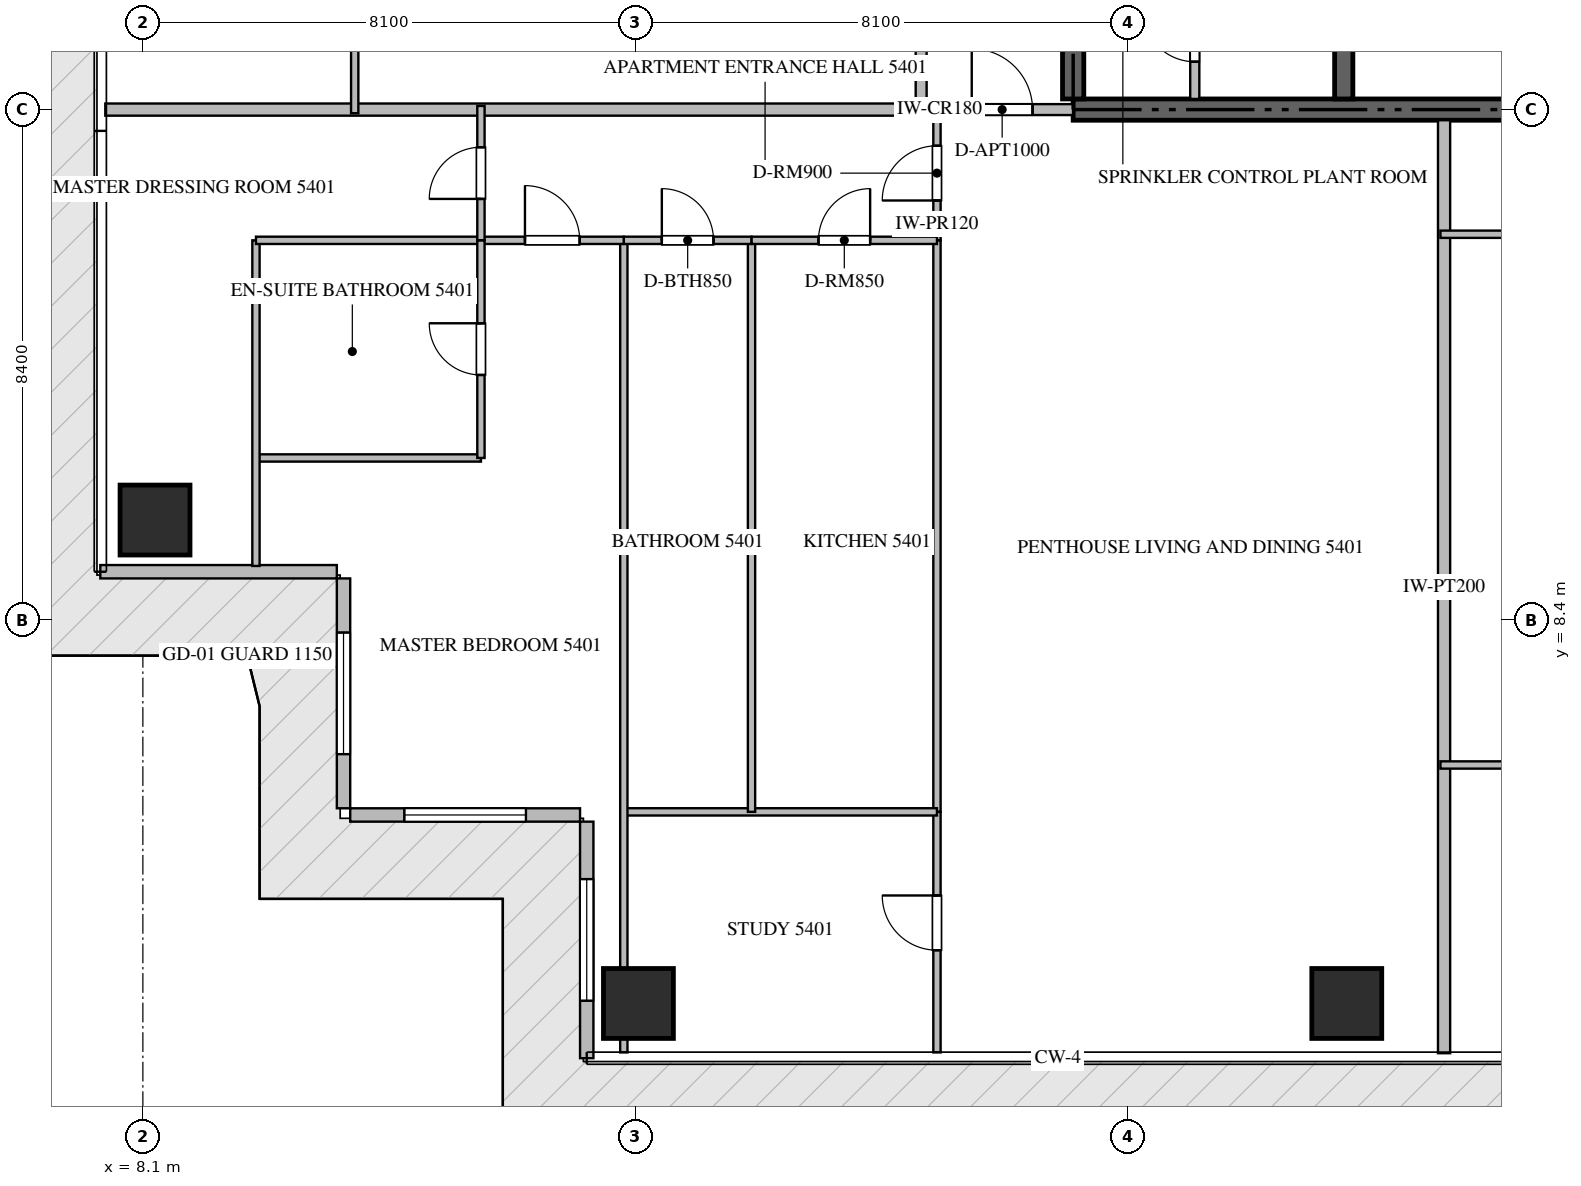
"""IFC4 building model, lengths in metres.
Left out: names, types, materials, properties, quantities, classifications, styles, units other than length and angle.
Written with IfcOpenShell. Run it as: python <this file> out.ifc"""

import sys

from ifc_helpers import new_model, si_unit, direction, frame, frame_2d, origin, origin_2d, place, context, subcontext, project, spatial, rectangle, extrude, source, transform, mapped, element, fill, save


model = new_model("IFC4")
c1 = context("Model", 3, precision=1e-05, world=origin(), true_north=direction((0.0, 1.0)))
c2 = subcontext(c1, "Body", "Model", "MODEL_VIEW")
j1 = project(units=[si_unit("LENGTHUNIT", "METRE"), si_unit("PLANEANGLEUNIT", "RADIAN")], contexts=[c1])
p1 = place(None, origin())
s1 = spatial("IfcSite", under=j1, at=p1, CompositionType="ELEMENT")
p2 = place(p1, origin())
s2 = spatial("IfcBuilding", under=s1, at=p2, CompositionType="ELEMENT")
p3 = place(p2, frame((0.0, 0.0, 218.15)))
s3 = spatial("IfcBuildingStorey", under=s2, at=p3, CompositionType="ELEMENT", Elevation=218.15)
p4 = place(p3, frame((23.4, 16.8, -0.26), z_axis=(0.0, 0.0, 1.0), x_axis=(1.0, 0.0, 0.0)))
e1 = element("IfcWall", 1, at=p4, inside=s3, PredefinedType="SHEAR", context=c2, shape_type="SweptSolid", body=[
    extrude(rectangle(XDim=18.0, YDim=0.35, at=frame_2d((9.0, 0.0))), origin(), (0.0, 0.0, 1.0), 3.848),
])
p5 = place(p3, frame((23.4, 16.975, -0.26), z_axis=(0.0, 0.0, 1.0), x_axis=(0.0, 1.0, 0.0)))
e2 = element("IfcWall", 2, at=p5, inside=s3, PredefinedType="SHEAR", context=c2, shape_type="SweptSolid", body=[
    extrude(rectangle(XDim=4.875, YDim=0.35, at=frame_2d((2.438, 0.0))), origin(), (0.0, 0.0, 1.0), 3.848),
])
p6 = place(p3, frame((27.85, 16.975, -0.26), z_axis=(0.0, 0.0, 1.0), x_axis=(0.0, 1.0, 0.0)))
e3 = element("IfcWall", 3, at=p6, inside=s3, PredefinedType="SHEAR", context=c2, shape_type="SweptSolid", body=[
    extrude(rectangle(XDim=4.875, YDim=0.3, at=frame_2d((2.438, 0.0))), origin(), (0.0, 0.0, 1.0), 3.848),
])
m1 = source(origin(), c2, "Body", "SweptSolid", [
    extrude(rectangle(XDim=1.15, YDim=1.15, at=origin_2d()), origin(), (0.0, 0.0, 1.0), 3.85),
])
for number, where, z_axis, x_axis in (
    (4, (16.25, 2.1, -0.26), (0.0, 0.0, 1.0), (1.0, 0.0, 0.0)),
    (5, (27.9, 2.1, -0.26), (0.0, 0.0, 1.0), (1.0, 0.0, 0.0)),
    (6, (8.3, 10.05, -0.26), (0.0, 0.0, 1.0), (1.0, 0.0, 0.0)),
):
    element("IfcColumn", number, at=place(p3, frame(where, z_axis=z_axis, x_axis=x_axis)), inside=s3, PredefinedType="COLUMN", context=c2, shape_type="MappedRepresentation", body=[
        mapped(m1, transform((0.0, 0.0, 0.0), scale=1.0)),
    ])
p7 = place(p3, frame((7.4, 9.2, 0.0), z_axis=(0.0, 0.0, 1.0), x_axis=(1.0, 0.0, 0.0)))
e7 = element("IfcWall", 7, at=p7, inside=s3, PredefinedType="ELEMENTEDWALL", context=c2, shape_type="SweptSolid", body=[
    extrude(rectangle(XDim=3.89, YDim=0.22, at=frame_2d((1.945, 0.0))), origin(), (0.0, 0.0, 1.0), 3.575),
])
p8 = place(p3, frame((11.4, 9.09, 0.0), z_axis=(0.0, 0.0, 1.0), x_axis=(0.0, -1.0, 0.0)))
e8 = element("IfcWall", 8, at=p8, inside=s3, PredefinedType="ELEMENTEDWALL", context=c2, shape_type="SweptSolid", body=[
    extrude(rectangle(XDim=3.78, YDim=0.22, at=frame_2d((1.89, 0.0))), origin(), (0.0, 0.0, 1.0), 3.575),
])
p9 = place(p8, frame((0.89, 0.0, 0.65)))
e9 = element("IfcOpeningElement", 9, at=p9, cuts=e8, PredefinedType="OPENING", context=c2, shape_type="SweptSolid", body=[
    extrude(rectangle(XDim=2.0, YDim=2.2, at=frame_2d((1.0, 1.1))), frame((0.0, 0.12, 0.0), z_axis=(0.0, -1.0, 0.0), x_axis=(1.0, 0.0, 0.0)), (0.0, 0.0, 1.0), 0.24),
])
p10 = place(p3, frame((11.51, 5.2, 0.0), z_axis=(0.0, 0.0, 1.0), x_axis=(1.0, 0.0, 0.0)))
e10 = element("IfcWall", 10, at=p10, inside=s3, PredefinedType="ELEMENTEDWALL", context=c2, shape_type="SweptSolid", body=[
    extrude(rectangle(XDim=3.78, YDim=0.22, at=frame_2d((1.89, 0.0))), origin(), (0.0, 0.0, 1.0), 3.575),
])
p11 = place(p10, frame((0.89, 0.0, 0.65)))
e11 = element("IfcOpeningElement", 11, at=p11, cuts=e10, PredefinedType="OPENING", context=c2, shape_type="SweptSolid", body=[
    extrude(rectangle(XDim=2.0, YDim=2.2, at=frame_2d((1.0, 1.1))), frame((0.0, 0.12, 0.0), z_axis=(0.0, -1.0, 0.0), x_axis=(1.0, 0.0, 0.0)), (0.0, 0.0, 1.0), 0.24),
])
p12 = place(p3, frame((15.4, 5.09, 0.0), z_axis=(0.0, 0.0, 1.0), x_axis=(0.0, -1.0, 0.0)))
e12 = element("IfcWall", 12, at=p12, inside=s3, PredefinedType="ELEMENTEDWALL", context=c2, shape_type="SweptSolid", body=[
    extrude(rectangle(XDim=3.89, YDim=0.22, at=frame_2d((1.945, 0.0))), origin(), (0.0, 0.0, 1.0), 3.575),
])
p13 = place(p12, frame((0.945, 0.0, 0.65)))
e13 = element("IfcOpeningElement", 13, at=p13, cuts=e12, PredefinedType="OPENING", context=c2, shape_type="SweptSolid", body=[
    extrude(rectangle(XDim=2.0, YDim=2.2, at=frame_2d((1.0, 1.1))), frame((0.0, 0.12, 0.0), z_axis=(0.0, -1.0, 0.0), x_axis=(1.0, 0.0, 0.0)), (0.0, 0.0, 1.0), 0.24),
])
p14 = place(p3, frame((25.4, 16.975, 0.0), z_axis=(0.0, 0.0, 1.0), x_axis=(0.0, 1.0, 0.0)))
e14 = element("IfcWall", 14, at=p14, inside=s3, PredefinedType="PARTITIONING", context=c2, shape_type="SweptSolid", body=[
    extrude(rectangle(XDim=2.075, YDim=0.15, at=frame_2d((1.038, 0.0))), origin(), (0.0, 0.0, 1.0), 3.59),
])
p15 = place(p14, frame((0.612, 0.0, 0.0)))
e15 = element("IfcOpeningElement", 15, at=p15, cuts=e14, PredefinedType="OPENING", context=c2, shape_type="SweptSolid", body=[
    extrude(rectangle(XDim=0.85, YDim=2.1, at=frame_2d((0.425, 1.05))), frame((0.0, 0.085, 0.0), z_axis=(0.0, -1.0, 0.0), x_axis=(1.0, 0.0, 0.0)), (0.0, 0.0, 1.0), 0.17),
])
p16 = place(p3, frame((29.5, 1.282, 0.0), z_axis=(0.0, 0.0, 1.0), x_axis=(0.0, 1.0, 0.0)))
e16 = element("IfcWall", 16, at=p16, inside=s3, PredefinedType="PARTITIONING", context=c2, shape_type="SweptSolid", body=[
    extrude(rectangle(XDim=15.343, YDim=0.2, at=frame_2d((7.671, 0.0))), origin(), (0.0, 0.0, 1.0), 3.59),
])
p17 = place(p3, frame((7.482, 16.8, 0.0), z_axis=(0.0, 0.0, 1.0), x_axis=(1.0, 0.0, 0.0)))
e17 = element("IfcWall", 17, at=p17, inside=s3, PredefinedType="PARTITIONING", context=c2, shape_type="SweptSolid", body=[
    extrude(rectangle(XDim=13.418, YDim=0.2, at=frame_2d((6.709, 0.0))), origin(), (0.0, 0.0, 1.0), 3.59),
])
p18 = place(p3, frame((20.902, 16.8, 0.0), z_axis=(0.0, 0.0, 1.0), x_axis=(1.0, 0.0, 0.0)))
e18 = element("IfcWall", 18, at=p18, inside=s3, PredefinedType="PARTITIONING", context=c2, shape_type="SweptSolid", body=[
    extrude(rectangle(XDim=2.496, YDim=0.18, at=frame_2d((1.248, 0.0))), origin(), (0.0, 0.0, 1.0), 3.59),
])
p19 = place(p18, frame((0.83, 0.0, 0.0)))
e19 = element("IfcOpeningElement", 19, at=p19, cuts=e18, PredefinedType="OPENING", context=c2, shape_type="SweptSolid", body=[
    extrude(rectangle(XDim=1.0, YDim=2.15, at=frame_2d((0.5, 1.075))), frame((0.0, 0.1, 0.0), z_axis=(0.0, -1.0, 0.0), x_axis=(1.0, 0.0, 0.0)), (0.0, 0.0, 1.0), 0.2),
])
p20 = place(p3, frame((20.9, 16.8, 0.0), z_axis=(0.0, 0.0, 1.0), x_axis=(0.0, 1.0, 0.0)))
e20 = element("IfcWall", 20, at=p20, inside=s3, PredefinedType="PARTITIONING", context=c2, shape_type="SweptSolid", body=[
    extrude(rectangle(XDim=16.8, YDim=0.18, at=frame_2d((8.4, 0.0))), origin(), (0.0, 0.0, 1.0), 3.59),
])
p21 = place(p20, frame((14.5, 0.0, 0.0)))
e21 = element("IfcOpeningElement", 21, at=p21, cuts=e20, PredefinedType="OPENING", context=c2, shape_type="SweptSolid", body=[
    extrude(rectangle(XDim=1.0, YDim=2.15, at=frame_2d((0.5, 1.075))), frame((0.0, 0.1, 0.0), z_axis=(0.0, -1.0, 0.0), x_axis=(1.0, 0.0, 0.0)), (0.0, 0.0, 1.0), 0.2),
])
p22 = place(p3, frame((21.16, 14.65, 0.0), z_axis=(0.0, 0.0, 1.0), x_axis=(0.0, 1.0, 0.0)))
e22 = element("IfcWall", 22, at=p22, inside=s3, PredefinedType="PARTITIONING", context=c2, shape_type="SweptSolid", body=[
    extrude(rectangle(XDim=2.21, YDim=0.12, at=frame_2d((1.105, 0.0))), origin(), (0.0, 0.0, 1.0), 3.59),
])
p23 = place(p22, frame((0.655, 0.0, 0.0)))
e23 = element("IfcOpeningElement", 23, at=p23, cuts=e22, PredefinedType="OPENING", context=c2, shape_type="SweptSolid", body=[
    extrude(rectangle(XDim=0.9, YDim=2.1, at=frame_2d((0.45, 1.05))), frame((0.0, 0.07, 0.0), z_axis=(0.0, -1.0, 0.0), x_axis=(1.0, 0.0, 0.0)), (0.0, 0.0, 1.0), 0.14),
])
p24 = place(p3, frame((21.16, 1.295, 0.0), z_axis=(0.0, 0.0, 1.0), x_axis=(0.0, 1.0, 0.0)))
e24 = element("IfcWall", 24, at=p24, inside=s3, PredefinedType="PARTITIONING", context=c2, shape_type="SweptSolid", body=[
    extrude(rectangle(XDim=3.956, YDim=0.12, at=frame_2d((1.978, 0.0))), origin(), (0.0, 0.0, 1.0), 3.59),
])
p25 = place(p24, frame((1.681, 0.0, 0.0)))
e25 = element("IfcOpeningElement", 25, at=p25, cuts=e24, PredefinedType="OPENING", context=c2, shape_type="SweptSolid", body=[
    extrude(rectangle(XDim=0.9, YDim=2.1, at=frame_2d((0.45, 1.05))), frame((0.0, 0.07, 0.0), z_axis=(0.0, -1.0, 0.0), x_axis=(1.0, 0.0, 0.0)), (0.0, 0.0, 1.0), 0.14),
])
p26 = place(p3, frame((21.16, 5.253, 0.0), z_axis=(0.0, 0.0, 1.0), x_axis=(0.0, 1.0, 0.0)))
e26 = element("IfcWall", 26, at=p26, inside=s3, PredefinedType="PARTITIONING", context=c2, shape_type="SweptSolid", body=[
    extrude(rectangle(XDim=9.395, YDim=0.12, at=frame_2d((4.698, 0.0))), origin(), (0.0, 0.0, 1.0), 3.59),
])
p27 = place(p3, frame((16.01, 5.251, 0.0), z_axis=(0.0, 0.0, 1.0), x_axis=(1.0, 0.0, 0.0)))
e27 = element("IfcWall", 27, at=p27, inside=s3, PredefinedType="PARTITIONING", context=c2, shape_type="SweptSolid", body=[
    extrude(rectangle(XDim=5.15, YDim=0.12, at=frame_2d((2.575, 0.0))), origin(), (0.0, 0.0, 1.0), 3.59),
])
p28 = place(p3, frame((16.01, 1.295, 0.0), z_axis=(0.0, 0.0, 1.0), x_axis=(0.0, 1.0, 0.0)))
e28 = element("IfcWall", 28, at=p28, inside=s3, PredefinedType="PARTITIONING", context=c2, shape_type="SweptSolid", body=[
    extrude(rectangle(XDim=13.355, YDim=0.12, at=frame_2d((6.677, 0.0))), origin(), (0.0, 0.0, 1.0), 3.122),
])
p29 = place(p3, frame((18.11, 5.251, 0.0), z_axis=(0.0, 0.0, 1.0), x_axis=(0.0, 1.0, 0.0)))
e29 = element("IfcWall", 29, at=p29, inside=s3, PredefinedType="PARTITIONING", context=c2, shape_type="SweptSolid", body=[
    extrude(rectangle(XDim=9.399, YDim=0.12, at=frame_2d((4.699, 0.0))), origin(), (0.0, 0.0, 1.0), 3.59),
])
p30 = place(p3, frame((16.01, 14.65, 0.0), z_axis=(0.0, 0.0, 1.0), x_axis=(1.0, 0.0, 0.0)))
e30 = element("IfcWall", 30, at=p30, inside=s3, PredefinedType="PARTITIONING", context=c2, shape_type="SweptSolid", body=[
    extrude(rectangle(XDim=2.1, YDim=0.12, at=frame_2d((1.05, 0.0))), origin(), (0.0, 0.0, 1.0), 3.59),
])
p31 = place(p30, frame((0.625, 0.0, 0.0)))
e31 = element("IfcOpeningElement", 31, at=p31, cuts=e30, PredefinedType="OPENING", context=c2, shape_type="SweptSolid", body=[
    extrude(rectangle(XDim=0.85, YDim=2.1, at=frame_2d((0.425, 1.05))), frame((0.0, 0.07, 0.0), z_axis=(0.0, -1.0, 0.0), x_axis=(1.0, 0.0, 0.0)), (0.0, 0.0, 1.0), 0.14),
])
p32 = place(p3, frame((18.112, 14.65, 0.0), z_axis=(0.0, 0.0, 1.0), x_axis=(1.0, 0.0, 0.0)))
e32 = element("IfcWall", 32, at=p32, inside=s3, PredefinedType="PARTITIONING", context=c2, shape_type="SweptSolid", body=[
    extrude(rectangle(XDim=3.048, YDim=0.12, at=frame_2d((1.524, 0.0))), origin(), (0.0, 0.0, 1.0), 3.59),
])
p33 = place(p32, frame((1.099, 0.0, 0.0)))
e33 = element("IfcOpeningElement", 33, at=p33, cuts=e32, PredefinedType="OPENING", context=c2, shape_type="SweptSolid", body=[
    extrude(rectangle(XDim=0.85, YDim=2.1, at=frame_2d((0.425, 1.05))), frame((0.0, 0.07, 0.0), z_axis=(0.0, -1.0, 0.0), x_axis=(1.0, 0.0, 0.0)), (0.0, 0.0, 1.0), 0.14),
])
p34 = place(p3, frame((13.66, 14.65, 0.0), z_axis=(0.0, 0.0, 1.0), x_axis=(1.0, 0.0, 0.0)))
e34 = element("IfcWall", 34, at=p34, inside=s3, PredefinedType="PARTITIONING", context=c2, shape_type="SweptSolid", body=[
    extrude(rectangle(XDim=2.348, YDim=0.12, at=frame_2d((1.174, 0.0))), origin(), (0.0, 0.0, 1.0), 3.59),
])
p35 = place(p34, frame((0.724, 0.0, 0.0)))
e35 = element("IfcOpeningElement", 35, at=p35, cuts=e34, PredefinedType="OPENING", context=c2, shape_type="SweptSolid", body=[
    extrude(rectangle(XDim=0.9, YDim=2.1, at=frame_2d((0.45, 1.05))), frame((0.0, 0.07, 0.0), z_axis=(0.0, -1.0, 0.0), x_axis=(1.0, 0.0, 0.0)), (0.0, 0.0, 1.0), 0.14),
])
p36 = place(p3, frame((9.96, 11.071, 0.0), z_axis=(0.0, 0.0, 1.0), x_axis=(1.0, 0.0, 0.0)))
e36 = element("IfcWall", 36, at=p36, inside=s3, PredefinedType="PARTITIONING", context=c2, shape_type="SweptSolid", body=[
    extrude(rectangle(XDim=3.7, YDim=0.12, at=frame_2d((1.85, 0.0))), origin(), (0.0, 0.0, 1.0), 3.59),
])
p37 = place(p3, frame((9.96, 9.295, 0.0), z_axis=(0.0, 0.0, 1.0), x_axis=(0.0, 1.0, 0.0)))
e37 = element("IfcWall", 37, at=p37, inside=s3, PredefinedType="PARTITIONING", context=c2, shape_type="SweptSolid", body=[
    extrude(rectangle(XDim=5.355, YDim=0.12, at=frame_2d((2.677, 0.0))), origin(), (0.0, 0.0, 1.0), 3.59),
])
p38 = place(p3, frame((9.96, 14.65, 0.0), z_axis=(0.0, 0.0, 1.0), x_axis=(1.0, 0.0, 0.0)))
e38 = element("IfcWall", 38, at=p38, inside=s3, PredefinedType="PARTITIONING", context=c2, shape_type="SweptSolid", body=[
    extrude(rectangle(XDim=3.698, YDim=0.12, at=frame_2d((1.849, 0.0))), origin(), (0.0, 0.0, 1.0), 3.59),
])
p39 = place(p3, frame((13.66, 11.071, 0.0), z_axis=(0.0, 0.0, 1.0), x_axis=(0.0, 1.0, 0.0)))
e39 = element("IfcWall", 39, at=p39, inside=s3, PredefinedType="PARTITIONING", context=c2, shape_type="SweptSolid", body=[
    extrude(rectangle(XDim=3.579, YDim=0.12, at=frame_2d((1.79, 0.0))), origin(), (0.0, 0.0, 1.0), 3.59),
])
p40 = place(p39, frame((1.365, 0.0, 0.0)))
e40 = element("IfcOpeningElement", 40, at=p40, cuts=e39, PredefinedType="OPENING", context=c2, shape_type="SweptSolid", body=[
    extrude(rectangle(XDim=0.85, YDim=2.1, at=frame_2d((0.425, 1.05))), frame((0.0, 0.07, 0.0), z_axis=(0.0, -1.0, 0.0), x_axis=(1.0, 0.0, 0.0)), (0.0, 0.0, 1.0), 0.14),
])
p41 = place(p3, frame((13.66, 14.652, 0.0), z_axis=(0.0, 0.0, 1.0), x_axis=(0.0, 1.0, 0.0)))
e41 = element("IfcWall", 41, at=p41, inside=s3, PredefinedType="PARTITIONING", context=c2, shape_type="SweptSolid", body=[
    extrude(rectangle(XDim=2.208, YDim=0.12, at=frame_2d((1.104, 0.0))), origin(), (0.0, 0.0, 1.0), 3.59),
])
p42 = place(p41, frame((0.679, 0.0, 0.0)))
e42 = element("IfcOpeningElement", 42, at=p42, cuts=e41, PredefinedType="OPENING", context=c2, shape_type="SweptSolid", body=[
    extrude(rectangle(XDim=0.85, YDim=2.1, at=frame_2d((0.425, 1.05))), frame((0.0, 0.07, 0.0), z_axis=(0.0, -1.0, 0.0), x_axis=(1.0, 0.0, 0.0)), (0.0, 0.0, 1.0), 0.14),
])
for number, where, z_axis, x_axis in (
    (43, (29.44, 6.022, 0.0), (0.0, 0.0, 1.0), (1.0, 0.0, 0.0)),
    (44, (29.44, 14.75, 0.0), (0.0, 0.0, 1.0), (1.0, 0.0, 0.0)),
):
    element("IfcWall", number, at=place(p3, frame(where, z_axis=z_axis, x_axis=x_axis)), inside=s3, PredefinedType="PARTITIONING", context=c2, shape_type="SweptSolid", body=[
        extrude(rectangle(XDim=9.06, YDim=0.12, at=frame_2d((4.53, 0.0))), origin(), (0.0, 0.0, 1.0), 3.59),
    ])
p43 = place(p3, frame((11.584, 16.74, 0.0), z_axis=(0.0, 0.0, 1.0), x_axis=(0.0, 1.0, 0.0)))
e45 = element("IfcWall", 45, at=p43, inside=s3, PredefinedType="PARTITIONING", context=c2, shape_type="SweptSolid", body=[
    extrude(rectangle(XDim=10.48, YDim=0.12, at=frame_2d((5.24, 0.0))), origin(), (0.0, 0.0, 1.0), 3.59),
])
m2 = source(origin(), c2, "Body", "SweptSolid", [
    extrude(rectangle(XDim=2.0, YDim=2.2, at=frame_2d((1.0, 1.1))), frame((0.0, 0.03, 0.0), z_axis=(0.0, -1.0, 0.0), x_axis=(1.0, 0.0, 0.0)), (0.0, 0.0, 1.0), 0.06),
])
p44 = place(p9, origin())
e46 = element("IfcWindow", 46, at=p44, inside=s3, PartitioningType="SINGLE_PANEL", PredefinedType="WINDOW", context=c2, shape_type="MappedRepresentation", body=[
    mapped(m2, transform((0.0, 0.0, 0.0), scale=1.0)),
])
fill(e9, e46)
p45 = place(p11, origin())
e47 = element("IfcWindow", 47, at=p45, inside=s3, PartitioningType="SINGLE_PANEL", PredefinedType="WINDOW", context=c2, shape_type="MappedRepresentation", body=[
    mapped(m2, transform((0.0, 0.0, 0.0), scale=1.0)),
])
fill(e11, e47)
p46 = place(p13, origin())
e48 = element("IfcWindow", 48, at=p46, inside=s3, PartitioningType="SINGLE_PANEL", PredefinedType="WINDOW", context=c2, shape_type="MappedRepresentation", body=[
    mapped(m2, transform((0.0, 0.0, 0.0), scale=1.0)),
])
fill(e13, e48)
m3 = source(origin(), c2, "Body", "SweptSolid", [
    extrude(rectangle(XDim=0.85, YDim=2.1, at=frame_2d((0.425, 1.05))), frame((0.0, 0.025, 0.0), z_axis=(0.0, -1.0, 0.0), x_axis=(1.0, 0.0, 0.0)), (0.0, 0.0, 1.0), 0.05),
])
p47 = place(p15, origin())
e49 = element("IfcDoor", 49, at=p47, inside=s3, OperationType="SINGLE_SWING_RIGHT", PredefinedType="DOOR", context=c2, shape_type="MappedRepresentation", body=[
    mapped(m3, transform((0.0, 0.0, 0.0), scale=1.0)),
])
fill(e15, e49)
m4 = source(origin(), c2, "Body", "SweptSolid", [
    extrude(rectangle(XDim=1.0, YDim=2.15, at=frame_2d((0.5, 1.075))), frame((0.0, 0.025, 0.0), z_axis=(0.0, -1.0, 0.0), x_axis=(1.0, 0.0, 0.0)), (0.0, 0.0, 1.0), 0.05),
])
p48 = place(p19, origin())
e50 = element("IfcDoor", 50, at=p48, inside=s3, OperationType="SINGLE_SWING_LEFT", PredefinedType="DOOR", context=c2, shape_type="MappedRepresentation", body=[
    mapped(m4, transform((0.0, 0.0, 0.0), scale=1.0)),
])
fill(e19, e50)
m5 = source(origin(), c2, "Body", "SweptSolid", [
    extrude(rectangle(XDim=0.9, YDim=2.1, at=frame_2d((0.45, 1.05))), frame((0.0, 0.025, 0.0), z_axis=(0.0, -1.0, 0.0), x_axis=(1.0, 0.0, 0.0)), (0.0, 0.0, 1.0), 0.05),
])
p49 = place(p23, origin())
e51 = element("IfcDoor", 51, at=p49, inside=s3, OperationType="SINGLE_SWING_LEFT", PredefinedType="DOOR", context=c2, shape_type="MappedRepresentation", body=[
    mapped(m5, transform((0.0, 0.0, 0.0), scale=1.0)),
])
fill(e23, e51)
p50 = place(p25, origin())
e52 = element("IfcDoor", 52, at=p50, inside=s3, OperationType="SINGLE_SWING_RIGHT", PredefinedType="DOOR", context=c2, shape_type="MappedRepresentation", body=[
    mapped(m5, transform((0.0, 0.0, 0.0), scale=1.0)),
])
fill(e25, e52)
p51 = place(p31, origin())
e53 = element("IfcDoor", 53, at=p51, inside=s3, OperationType="SINGLE_SWING_LEFT", PredefinedType="DOOR", context=c2, shape_type="MappedRepresentation", body=[
    mapped(m3, transform((0.0, 0.0, 0.0), scale=1.0)),
])
fill(e31, e53)
p52 = place(p33, origin())
e54 = element("IfcDoor", 54, at=p52, inside=s3, OperationType="SINGLE_SWING_RIGHT", PredefinedType="DOOR", context=c2, shape_type="MappedRepresentation", body=[
    mapped(m3, transform((0.0, 0.0, 0.0), scale=1.0)),
])
fill(e33, e54)
p53 = place(p35, origin())
e55 = element("IfcDoor", 55, at=p53, inside=s3, OperationType="SINGLE_SWING_LEFT", PredefinedType="DOOR", context=c2, shape_type="MappedRepresentation", body=[
    mapped(m5, transform((0.0, 0.0, 0.0), scale=1.0)),
])
fill(e35, e55)
p54 = place(p40, origin())
e56 = element("IfcDoor", 56, at=p54, inside=s3, OperationType="SINGLE_SWING_RIGHT", PredefinedType="DOOR", context=c2, shape_type="MappedRepresentation", body=[
    mapped(m3, transform((0.0, 0.0, 0.0), scale=1.0)),
])
fill(e40, e56)
p55 = place(p42, origin())
e57 = element("IfcDoor", 57, at=p55, inside=s3, OperationType="SINGLE_SWING_LEFT", PredefinedType="DOOR", context=c2, shape_type="MappedRepresentation", body=[
    mapped(m3, transform((0.0, 0.0, 0.0), scale=1.0)),
])
fill(e42, e57)
save(model, sys.argv[1])
